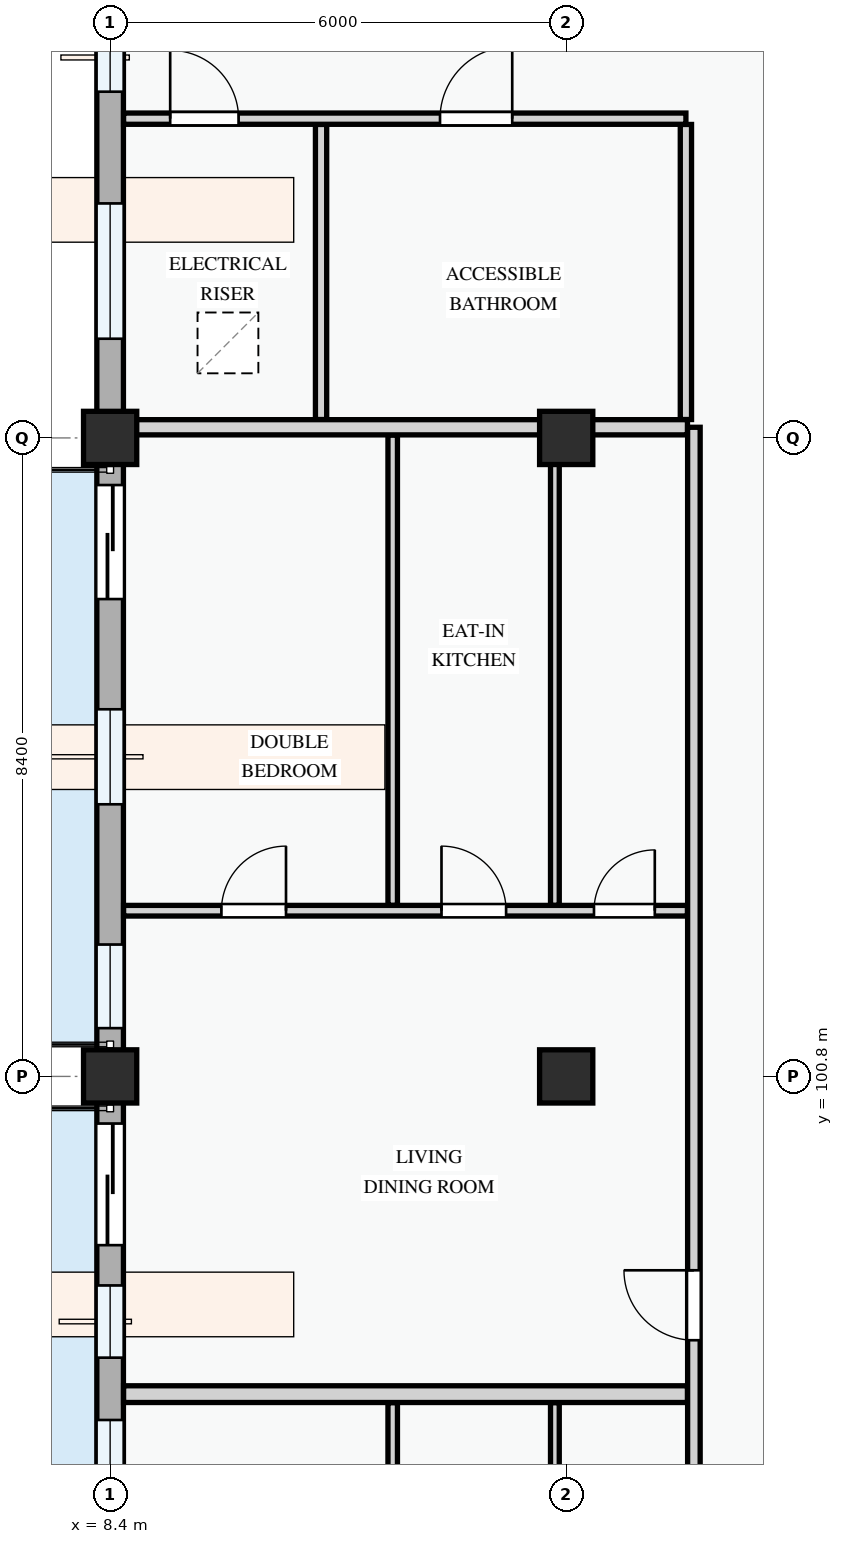
"""IFC4 building model, lengths in metres.
Left out: names, types, materials, properties, quantities, classifications, styles, units other than length and angle.
Written with IfcOpenShell. Run it as: python <this file> out.ifc"""

import sys

from ifc_helpers import new_model, si_unit, direction, frame, frame_2d, origin, origin_2d, place, context, subcontext, project, spatial, rectangle, extrude, element, fill, save


model = new_model("IFC4")
c1 = context("Model", 3, precision=1e-05, world=origin(), true_north=direction((0.0, 1.0)))
c2 = subcontext(c1, "Body", "Model", "MODEL_VIEW")
j1 = project(units=[si_unit("LENGTHUNIT", "METRE"), si_unit("PLANEANGLEUNIT", "RADIAN")], contexts=[c1])
p1 = place(None, origin())
s1 = spatial("IfcSite", under=j1, at=p1, CompositionType="ELEMENT")
p2 = place(p1, origin())
s2 = spatial("IfcBuilding", under=s1, at=p2, CompositionType="ELEMENT")
p3 = place(p2, frame((0.0, 0.0, 14.7)))
s3 = spatial("IfcBuildingStorey", under=s2, at=p3, CompositionType="ELEMENT", Elevation=14.7)
for number, where, z_axis, x_axis in (
    (1, (8.4, 100.8, 0.0), (0.0, 0.0, 1.0), (1.0, 0.0, 0.0)),
    (2, (8.4, 109.2, 0.0), (0.0, 0.0, 1.0), (1.0, 0.0, 0.0)),
    (3, (14.4, 100.8, 0.0), (0.0, 0.0, 1.0), (1.0, 0.0, 0.0)),
    (4, (14.4, 109.2, 0.0), (0.0, 0.0, 1.0), (1.0, 0.0, 0.0)),
):
    element("IfcColumn", number, at=place(p3, frame(where, z_axis=z_axis, x_axis=x_axis)), inside=s3, PredefinedType="COLUMN", context=c2, shape_type="SweptSolid", body=[
        extrude(rectangle(XDim=0.7, YDim=0.7, at=origin_2d()), origin(), (0.0, 0.0, 1.0), 3.3),
    ])
p4 = place(p3, frame((8.4, 115.2, 0.0), z_axis=(0.0, 0.0, 1.0), x_axis=(0.0, -1.0, 0.0)))
e5 = element("IfcWall", 5, at=p4, inside=s3, PredefinedType="STANDARD", context=c2, shape_type="SweptSolid", body=[
    extrude(rectangle(XDim=6.0, YDim=0.35, at=frame_2d((3.0, 0.0))), origin(), (0.0, 0.0, 1.0), 2.445),
])
p5 = place(p4, frame((0.545, 0.0, 0.78)))
e6 = element("IfcOpeningElement", 6, at=p5, cuts=e5, PredefinedType="OPENING", context=c2, shape_type="SweptSolid", body=[
    extrude(rectangle(XDim=0.9, YDim=1.2, at=frame_2d((0.45, 0.6))), frame((0.0, 0.185, 0.0), z_axis=(0.0, -1.0, 0.0), x_axis=(1.0, 0.0, 0.0)), (0.0, 0.0, 1.0), 0.37),
])
p6 = place(p4, frame((2.915, 0.0, 0.78)))
e7 = element("IfcOpeningElement", 7, at=p6, cuts=e5, PredefinedType="OPENING", context=c2, shape_type="SweptSolid", body=[
    extrude(rectangle(XDim=1.78, YDim=1.42, at=frame_2d((0.89, 0.71))), frame((0.0, 0.185, 0.0), z_axis=(0.0, -1.0, 0.0), x_axis=(1.0, 0.0, 0.0)), (0.0, 0.0, 1.0), 0.37),
])
p7 = place(p3, frame((8.4, 109.2, 0.0), z_axis=(0.0, 0.0, 1.0), x_axis=(0.0, -1.0, 0.0)))
e8 = element("IfcWall", 8, at=p7, inside=s3, PredefinedType="STANDARD", context=c2, shape_type="SweptSolid", body=[
    extrude(rectangle(XDim=8.4, YDim=0.35, at=frame_2d((4.2, 0.0))), origin(), (0.0, 0.0, 1.0), 2.345),
])
p8 = place(p7, frame((0.62, 0.0, 0.0)))
e9 = element("IfcOpeningElement", 9, at=p8, cuts=e8, PredefinedType="OPENING", context=c2, shape_type="SweptSolid", body=[
    extrude(rectangle(XDim=1.5, YDim=2.2, at=frame_2d((0.75, 1.1))), frame((0.0, 0.185, 0.0), z_axis=(0.0, -1.0, 0.0), x_axis=(1.0, 0.0, 0.0)), (0.0, 0.0, 1.0), 0.37),
])
p9 = place(p7, frame((3.57, 0.0, 0.78)))
e10 = element("IfcOpeningElement", 10, at=p9, cuts=e8, PredefinedType="OPENING", context=c2, shape_type="SweptSolid", body=[
    extrude(rectangle(XDim=1.25, YDim=1.3, at=frame_2d((0.625, 0.65))), frame((0.0, 0.185, 0.0), z_axis=(0.0, -1.0, 0.0), x_axis=(1.0, 0.0, 0.0)), (0.0, 0.0, 1.0), 0.37),
])
p10 = place(p7, frame((6.665, 0.0, 0.78)))
e11 = element("IfcOpeningElement", 11, at=p10, cuts=e8, PredefinedType="OPENING", context=c2, shape_type="SweptSolid", body=[
    extrude(rectangle(XDim=1.1, YDim=1.3, at=frame_2d((0.55, 0.65))), frame((0.0, 0.185, 0.0), z_axis=(0.0, -1.0, 0.0), x_axis=(1.0, 0.0, 0.0)), (0.0, 0.0, 1.0), 0.37),
])
p11 = place(p3, frame((8.4, 100.8, 0.0), z_axis=(0.0, 0.0, 1.0), x_axis=(0.0, -1.0, 0.0)))
e12 = element("IfcWall", 12, at=p11, inside=s3, PredefinedType="STANDARD", context=c2, shape_type="SweptSolid", body=[
    extrude(rectangle(XDim=6.0, YDim=0.35, at=frame_2d((3.0, 0.0))), origin(), (0.0, 0.0, 1.0), 2.445),
])
p12 = place(p11, frame((0.62, 0.0, 0.0)))
e13 = element("IfcOpeningElement", 13, at=p12, cuts=e12, PredefinedType="OPENING", context=c2, shape_type="SweptSolid", body=[
    extrude(rectangle(XDim=1.6, YDim=2.2, at=frame_2d((0.8, 1.1))), frame((0.0, 0.185, 0.0), z_axis=(0.0, -1.0, 0.0), x_axis=(1.0, 0.0, 0.0)), (0.0, 0.0, 1.0), 0.37),
])
p13 = place(p11, frame((2.75, 0.0, 0.78)))
e14 = element("IfcOpeningElement", 14, at=p13, cuts=e12, PredefinedType="OPENING", context=c2, shape_type="SweptSolid", body=[
    extrude(rectangle(XDim=0.95, YDim=1.15, at=frame_2d((0.475, 0.575))), frame((0.0, 0.185, 0.0), z_axis=(0.0, -1.0, 0.0), x_axis=(1.0, 0.0, 0.0)), (0.0, 0.0, 1.0), 0.37),
])
p14 = place(p11, frame((4.52, 0.0, 0.78)))
e15 = element("IfcOpeningElement", 15, at=p14, cuts=e12, PredefinedType="OPENING", context=c2, shape_type="SweptSolid", body=[
    extrude(rectangle(XDim=0.95, YDim=1.15, at=frame_2d((0.475, 0.575))), frame((0.0, 0.185, 0.0), z_axis=(0.0, -1.0, 0.0), x_axis=(1.0, 0.0, 0.0)), (0.0, 0.0, 1.0), 0.37),
])
for number, where, z_axis, x_axis in (
    (16, (11.175, 113.324, 0.0), (0.0, 0.0, 1.0), (0.0, -1.0, 0.0)),
    (17, (15.975, 113.324, 0.0), (0.0, 0.0, 1.0), (0.0, -1.0, 0.0)),
):
    element("IfcWall", number, at=place(p3, frame(where, z_axis=z_axis, x_axis=x_axis)), inside=s3, PredefinedType="PARTITIONING", context=c2, shape_type="SweptSolid", body=[
        extrude(rectangle(XDim=3.882, YDim=0.148, at=frame_2d((1.941, 0.0))), origin(), (0.0, 0.0, 1.0), 3.0),
    ])
p15 = place(p3, frame((8.577, 113.4, 0.0), z_axis=(0.0, 0.0, 1.0), x_axis=(1.0, 0.0, 0.0)))
e18 = element("IfcWall", 18, at=p15, inside=s3, PredefinedType="PARTITIONING", context=c2, shape_type="SweptSolid", body=[
    extrude(rectangle(XDim=7.398, YDim=0.148, at=frame_2d((3.699, 0.0))), origin(), (0.0, 0.0, 1.0), 3.0),
])
p16 = place(p15, frame((0.613, 0.0, 0.0)))
e19 = element("IfcOpeningElement", 19, at=p16, cuts=e18, PredefinedType="OPENING", context=c2, shape_type="SweptSolid", body=[
    extrude(rectangle(XDim=0.9, YDim=2.1, at=frame_2d((0.45, 1.05))), frame((0.0, 0.084, 0.0), z_axis=(0.0, -1.0, 0.0), x_axis=(1.0, 0.0, 0.0)), (0.0, 0.0, 1.0), 0.168),
])
p17 = place(p15, frame((4.163, 0.0, 0.0)))
e20 = element("IfcOpeningElement", 20, at=p17, cuts=e18, PredefinedType="OPENING", context=c2, shape_type="SweptSolid", body=[
    extrude(rectangle(XDim=0.95, YDim=2.1, at=frame_2d((0.475, 1.05))), frame((0.0, 0.084, 0.0), z_axis=(0.0, -1.0, 0.0), x_axis=(1.0, 0.0, 0.0)), (0.0, 0.0, 1.0), 0.168),
])
p18 = place(p3, frame((12.118, 90.002, 0.0), z_axis=(0.0, 0.0, 1.0), x_axis=(0.0, 1.0, 0.0)))
e21 = element("IfcWall", 21, at=p18, inside=s3, PredefinedType="PARTITIONING", context=c2, shape_type="SweptSolid", body=[
    extrude(rectangle(XDim=6.506, YDim=0.125, at=frame_2d((3.253, 0.0))), origin(), (0.0, 0.0, 1.0), 3.0),
])
p19 = place(p3, frame((14.251, 90.002, 0.0), z_axis=(0.0, 0.0, 1.0), x_axis=(0.0, 1.0, 0.0)))
e22 = element("IfcWall", 22, at=p19, inside=s3, PredefinedType="PARTITIONING", context=c2, shape_type="SweptSolid", body=[
    extrude(rectangle(XDim=6.506, YDim=0.115, at=frame_2d((3.253, 0.0))), origin(), (0.0, 0.0, 1.0), 2.425),
])
p20 = place(p3, frame((8.577, 102.98, 0.0), z_axis=(0.0, 0.0, 1.0), x_axis=(1.0, 0.0, 0.0)))
e23 = element("IfcWall", 23, at=p20, inside=s3, PredefinedType="PARTITIONING", context=c2, shape_type="SweptSolid", body=[
    extrude(rectangle(XDim=7.419, YDim=0.14, at=frame_2d((3.709, 0.0))), origin(), (0.0, 0.0, 1.0), 3.0),
])
p21 = place(p20, frame((1.287, 0.0, 0.0)))
e24 = element("IfcOpeningElement", 24, at=p21, cuts=e23, PredefinedType="OPENING", context=c2, shape_type="SweptSolid", body=[
    extrude(rectangle(XDim=0.85, YDim=2.1, at=frame_2d((0.425, 1.05))), frame((0.0, 0.08, 0.0), z_axis=(0.0, -1.0, 0.0), x_axis=(1.0, 0.0, 0.0)), (0.0, 0.0, 1.0), 0.16),
])
p22 = place(p20, frame((4.182, 0.0, 0.0)))
e25 = element("IfcOpeningElement", 25, at=p22, cuts=e23, PredefinedType="OPENING", context=c2, shape_type="SweptSolid", body=[
    extrude(rectangle(XDim=0.85, YDim=2.1, at=frame_2d((0.425, 1.05))), frame((0.0, 0.08, 0.0), z_axis=(0.0, -1.0, 0.0), x_axis=(1.0, 0.0, 0.0)), (0.0, 0.0, 1.0), 0.16),
])
p23 = place(p20, frame((6.189, 0.0, 0.0)))
e26 = element("IfcOpeningElement", 26, at=p23, cuts=e23, PredefinedType="OPENING", context=c2, shape_type="SweptSolid", body=[
    extrude(rectangle(XDim=0.8, YDim=2.1, at=frame_2d((0.4, 1.05))), frame((0.0, 0.08, 0.0), z_axis=(0.0, -1.0, 0.0), x_axis=(1.0, 0.0, 0.0)), (0.0, 0.0, 1.0), 0.16),
])
p24 = place(p3, frame((12.118, 103.052, 0.0), z_axis=(0.0, 0.0, 1.0), x_axis=(0.0, 1.0, 0.0)))
e27 = element("IfcWall", 27, at=p24, inside=s3, PredefinedType="PARTITIONING", context=c2, shape_type="SweptSolid", body=[
    extrude(rectangle(XDim=6.186, YDim=0.125, at=frame_2d((3.093, 0.0))), origin(), (0.0, 0.0, 1.0), 3.0),
])
p25 = place(p3, frame((14.251, 103.052, 0.0), z_axis=(0.0, 0.0, 1.0), x_axis=(0.0, 1.0, 0.0)))
e28 = element("IfcWall", 28, at=p25, inside=s3, PredefinedType="PARTITIONING", context=c2, shape_type="SweptSolid", body=[
    extrude(rectangle(XDim=6.186, YDim=0.115, at=frame_2d((3.093, 0.0))), origin(), (0.0, 0.0, 1.0), 2.425),
])
p26 = place(p3, frame((8.577, 96.62, 0.0), z_axis=(0.0, 0.0, 1.0), x_axis=(1.0, 0.0, 0.0)))
e29 = element("IfcWall", 29, at=p26, inside=s3, PredefinedType="PARTITIONING", context=c2, shape_type="SweptSolid", body=[
    extrude(rectangle(XDim=7.419, YDim=0.22, at=frame_2d((3.709, 0.0))), origin(), (0.0, 0.0, 1.0), 3.0),
])
p27 = place(p3, frame((8.577, 109.34, 0.0), z_axis=(0.0, 0.0, 1.0), x_axis=(1.0, 0.0, 0.0)))
e30 = element("IfcWall", 30, at=p27, inside=s3, PredefinedType="PARTITIONING", context=c2, shape_type="SweptSolid", body=[
    extrude(rectangle(XDim=7.419, YDim=0.2, at=frame_2d((3.709, 0.0))), origin(), (0.0, 0.0, 1.0), 2.375),
])
p28 = place(p3, frame((16.08, 72.177, 0.0), z_axis=(0.0, 0.0, 1.0), x_axis=(0.0, 1.0, 0.0)))
e31 = element("IfcWall", 31, at=p28, inside=s3, PredefinedType="PARTITIONING", context=c2, shape_type="SweptSolid", body=[
    extrude(rectangle(XDim=37.163, YDim=0.165, at=frame_2d((18.582, 0.0))), origin(), (0.0, 0.0, 1.0), 3.0),
])
p29 = place(p28, frame((3.489, 0.0, 0.0)))
e32 = element("IfcOpeningElement", 32, at=p29, cuts=e31, PredefinedType="OPENING", context=c2, shape_type="SweptSolid", body=[
    extrude(rectangle(XDim=0.92, YDim=2.1, at=frame_2d((0.46, 1.05))), frame((0.0, 0.093, 0.0), z_axis=(0.0, -1.0, 0.0), x_axis=(1.0, 0.0, 0.0)), (0.0, 0.0, 1.0), 0.185),
])
p30 = place(p28, frame((16.543, 0.0, 0.0)))
e33 = element("IfcOpeningElement", 33, at=p30, cuts=e31, PredefinedType="OPENING", context=c2, shape_type="SweptSolid", body=[
    extrude(rectangle(XDim=0.92, YDim=2.1, at=frame_2d((0.46, 1.05))), frame((0.0, 0.093, 0.0), z_axis=(0.0, -1.0, 0.0), x_axis=(1.0, 0.0, 0.0)), (0.0, 0.0, 1.0), 0.185),
])
p31 = place(p28, frame((25.152, 0.0, 0.0)))
e34 = element("IfcOpeningElement", 34, at=p31, cuts=e31, PredefinedType="OPENING", context=c2, shape_type="SweptSolid", body=[
    extrude(rectangle(XDim=0.92, YDim=2.1, at=frame_2d((0.46, 1.05))), frame((0.0, 0.093, 0.0), z_axis=(0.0, -1.0, 0.0), x_axis=(1.0, 0.0, 0.0)), (0.0, 0.0, 1.0), 0.185),
])
p32 = place(p5, origin())
e35 = element("IfcWindow", 35, at=p32, inside=s3, PartitioningType="SINGLE_PANEL", PredefinedType="WINDOW", context=c2, shape_type="SweptSolid", body=[
    extrude(rectangle(XDim=0.9, YDim=1.2, at=frame_2d((0.45, 0.6))), frame((0.0, 0.03, 0.0), z_axis=(0.0, -1.0, 0.0), x_axis=(1.0, 0.0, 0.0)), (0.0, 0.0, 1.0), 0.06),
])
fill(e6, e35)
p33 = place(p6, origin())
e36 = element("IfcWindow", 36, at=p33, inside=s3, PartitioningType="DOUBLE_PANEL_VERTICAL", PredefinedType="WINDOW", context=c2, shape_type="SweptSolid", body=[
    extrude(rectangle(XDim=1.78, YDim=1.42, at=frame_2d((0.89, 0.71))), frame((0.0, 0.03, 0.0), z_axis=(0.0, -1.0, 0.0), x_axis=(1.0, 0.0, 0.0)), (0.0, 0.0, 1.0), 0.06),
])
fill(e7, e36)
p34 = place(p8, frame((1.5, 0.0, 0.0), z_axis=(0.0, 0.0, 1.0), x_axis=(-1.0, 0.0, 0.0)))
e37 = element("IfcDoor", 37, at=p34, inside=s3, OperationType="SLIDING_TO_RIGHT", PredefinedType="DOOR", context=c2, shape_type="SweptSolid", body=[
    extrude(rectangle(XDim=1.5, YDim=2.2, at=frame_2d((0.75, 1.1))), frame((0.0, 0.025, 0.0), z_axis=(0.0, -1.0, 0.0), x_axis=(1.0, 0.0, 0.0)), (0.0, 0.0, 1.0), 0.05),
])
fill(e9, e37)
p35 = place(p9, origin())
e38 = element("IfcWindow", 38, at=p35, inside=s3, PartitioningType="SINGLE_PANEL", PredefinedType="WINDOW", context=c2, shape_type="SweptSolid", body=[
    extrude(rectangle(XDim=1.25, YDim=1.3, at=frame_2d((0.625, 0.65))), frame((0.0, 0.03, 0.0), z_axis=(0.0, -1.0, 0.0), x_axis=(1.0, 0.0, 0.0)), (0.0, 0.0, 1.0), 0.06),
])
fill(e10, e38)
p36 = place(p10, origin())
e39 = element("IfcWindow", 39, at=p36, inside=s3, PartitioningType="SINGLE_PANEL", PredefinedType="WINDOW", context=c2, shape_type="SweptSolid", body=[
    extrude(rectangle(XDim=1.1, YDim=1.3, at=frame_2d((0.55, 0.65))), frame((0.0, 0.03, 0.0), z_axis=(0.0, -1.0, 0.0), x_axis=(1.0, 0.0, 0.0)), (0.0, 0.0, 1.0), 0.06),
])
fill(e11, e39)
p37 = place(p12, frame((1.6, 0.0, 0.0), z_axis=(0.0, 0.0, 1.0), x_axis=(-1.0, 0.0, 0.0)))
e40 = element("IfcDoor", 40, at=p37, inside=s3, OperationType="SLIDING_TO_LEFT", PredefinedType="DOOR", context=c2, shape_type="SweptSolid", body=[
    extrude(rectangle(XDim=1.6, YDim=2.2, at=frame_2d((0.8, 1.1))), frame((0.0, 0.025, 0.0), z_axis=(0.0, -1.0, 0.0), x_axis=(1.0, 0.0, 0.0)), (0.0, 0.0, 1.0), 0.05),
])
fill(e13, e40)
p38 = place(p13, origin())
e41 = element("IfcWindow", 41, at=p38, inside=s3, PartitioningType="SINGLE_PANEL", PredefinedType="WINDOW", context=c2, shape_type="SweptSolid", body=[
    extrude(rectangle(XDim=0.95, YDim=1.15, at=frame_2d((0.475, 0.575))), frame((0.0, 0.03, 0.0), z_axis=(0.0, -1.0, 0.0), x_axis=(1.0, 0.0, 0.0)), (0.0, 0.0, 1.0), 0.06),
])
fill(e14, e41)
p39 = place(p14, origin())
e42 = element("IfcWindow", 42, at=p39, inside=s3, PartitioningType="SINGLE_PANEL", PredefinedType="WINDOW", context=c2, shape_type="SweptSolid", body=[
    extrude(rectangle(XDim=0.95, YDim=1.15, at=frame_2d((0.475, 0.575))), frame((0.0, 0.03, 0.0), z_axis=(0.0, -1.0, 0.0), x_axis=(1.0, 0.0, 0.0)), (0.0, 0.0, 1.0), 0.06),
])
fill(e15, e42)
p40 = place(p16, origin())
e43 = element("IfcDoor", 43, at=p40, inside=s3, OperationType="SINGLE_SWING_LEFT", PredefinedType="DOOR", context=c2, shape_type="SweptSolid", body=[
    extrude(rectangle(XDim=0.9, YDim=2.1, at=frame_2d((0.45, 1.05))), frame((0.0, 0.025, 0.0), z_axis=(0.0, -1.0, 0.0), x_axis=(1.0, 0.0, 0.0)), (0.0, 0.0, 1.0), 0.05),
])
fill(e19, e43)
p41 = place(p17, origin())
e44 = element("IfcDoor", 44, at=p41, inside=s3, OperationType="SINGLE_SWING_RIGHT", PredefinedType="DOOR", context=c2, shape_type="SweptSolid", body=[
    extrude(rectangle(XDim=0.95, YDim=2.1, at=frame_2d((0.475, 1.05))), frame((0.0, 0.025, 0.0), z_axis=(0.0, -1.0, 0.0), x_axis=(1.0, 0.0, 0.0)), (0.0, 0.0, 1.0), 0.05),
])
fill(e20, e44)
p42 = place(p21, origin())
e45 = element("IfcDoor", 45, at=p42, inside=s3, OperationType="SINGLE_SWING_RIGHT", PredefinedType="DOOR", context=c2, shape_type="SweptSolid", body=[
    extrude(rectangle(XDim=0.85, YDim=2.1, at=frame_2d((0.425, 1.05))), frame((0.0, 0.025, 0.0), z_axis=(0.0, -1.0, 0.0), x_axis=(1.0, 0.0, 0.0)), (0.0, 0.0, 1.0), 0.05),
])
fill(e24, e45)
p43 = place(p22, origin())
e46 = element("IfcDoor", 46, at=p43, inside=s3, OperationType="SINGLE_SWING_LEFT", PredefinedType="DOOR", context=c2, shape_type="SweptSolid", body=[
    extrude(rectangle(XDim=0.85, YDim=2.1, at=frame_2d((0.425, 1.05))), frame((0.0, 0.025, 0.0), z_axis=(0.0, -1.0, 0.0), x_axis=(1.0, 0.0, 0.0)), (0.0, 0.0, 1.0), 0.05),
])
fill(e25, e46)
p44 = place(p23, origin())
e47 = element("IfcDoor", 47, at=p44, inside=s3, OperationType="SINGLE_SWING_RIGHT", PredefinedType="DOOR", context=c2, shape_type="SweptSolid", body=[
    extrude(rectangle(XDim=0.8, YDim=2.1, at=frame_2d((0.4, 1.05))), frame((0.0, 0.025, 0.0), z_axis=(0.0, -1.0, 0.0), x_axis=(1.0, 0.0, 0.0)), (0.0, 0.0, 1.0), 0.05),
])
fill(e26, e47)
p45 = place(p31, origin())
e48 = element("IfcDoor", 48, at=p45, inside=s3, OperationType="SINGLE_SWING_RIGHT", PredefinedType="DOOR", context=c2, shape_type="SweptSolid", body=[
    extrude(rectangle(XDim=0.92, YDim=2.1, at=frame_2d((0.46, 1.05))), frame((0.0, 0.025, 0.0), z_axis=(0.0, -1.0, 0.0), x_axis=(1.0, 0.0, 0.0)), (0.0, 0.0, 1.0), 0.05),
])
fill(e34, e48)
save(model, sys.argv[1])
